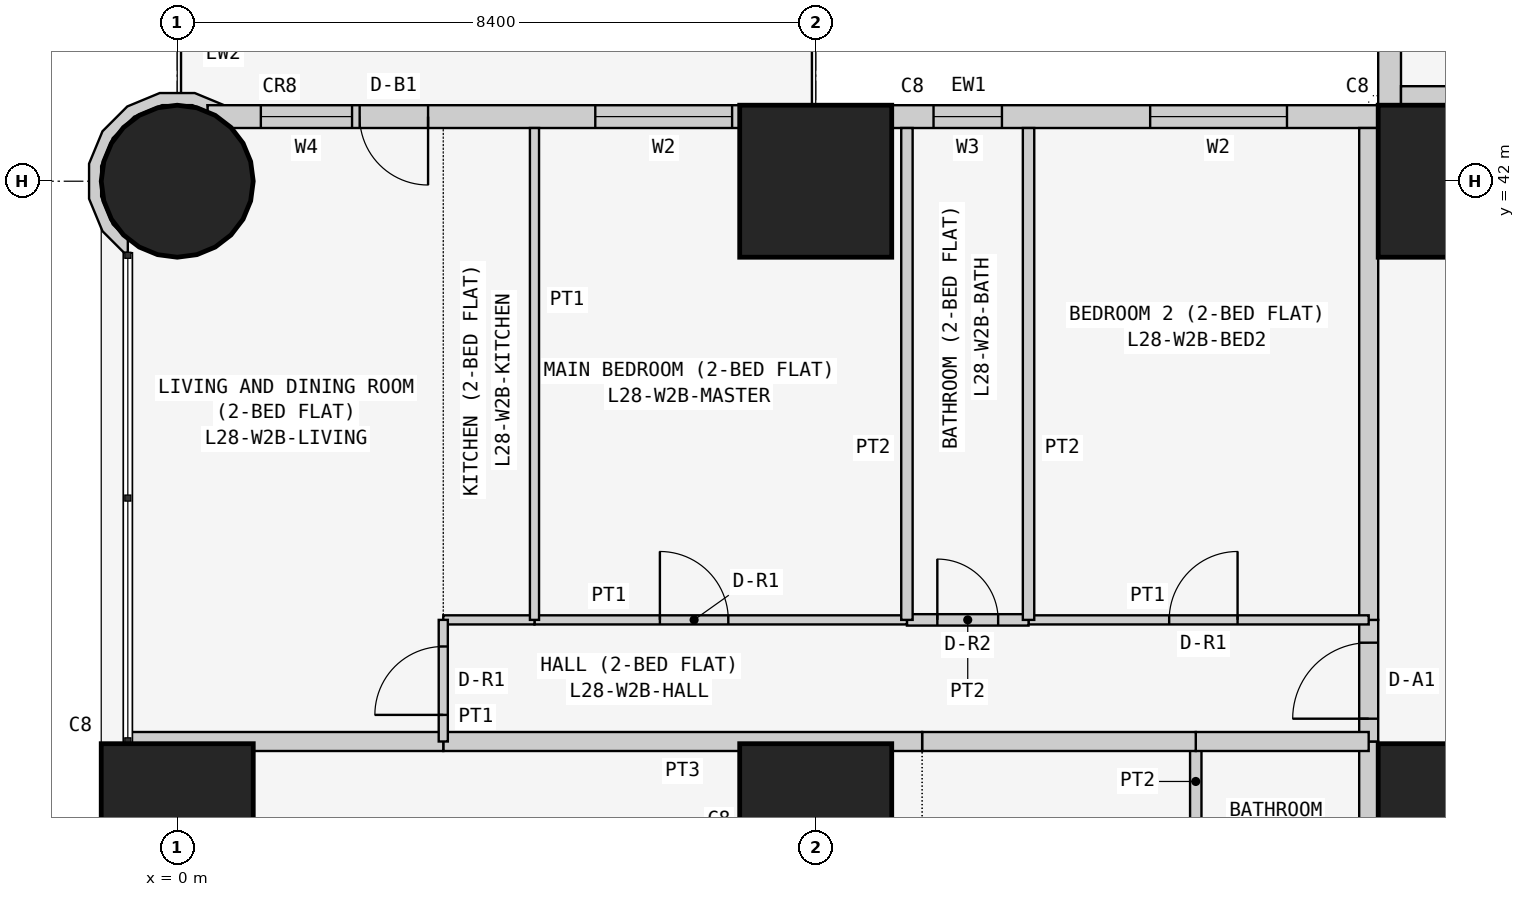
"""IFC4 building model, lengths in metres.
Left out: names, types, materials, properties, quantities, classifications, styles, units other than length and angle.
Written with IfcOpenShell. Run it as: python <this file> out.ifc"""

import sys

from ifc_helpers import new_model, si_unit, direction, frame, frame_2d, origin, origin_2d, place, context, subcontext, project, spatial, polyline, rectangle, circle, outline, extrude, element, fill, save


model = new_model("IFC4")
c1 = context("Model", 3, precision=1e-05, world=origin(), true_north=direction((0.0, 1.0)))
c2 = subcontext(c1, "Body", "Model", "MODEL_VIEW")
j1 = project(units=[si_unit("LENGTHUNIT", "METRE"), si_unit("PLANEANGLEUNIT", "RADIAN")], contexts=[c1])
p1 = place(None, origin())
s1 = spatial("IfcSite", under=j1, at=p1, CompositionType="ELEMENT")
p2 = place(p1, origin())
s2 = spatial("IfcBuilding", under=s1, at=p2, CompositionType="ELEMENT")
p3 = place(p2, frame((0.0, 0.0, 112.5)))
s3 = spatial("IfcBuildingStorey", under=s2, at=p3, CompositionType="ELEMENT", Elevation=112.5)
p4 = place(p3, frame((0.0, 33.6, 0.0), z_axis=(0.0, 0.0, 1.0), x_axis=(1.0, 0.0, 0.0)))
e1 = element("IfcColumn", 1, at=p4, inside=s3, PredefinedType="COLUMN", context=c2, shape_type="SweptSolid", body=[
    extrude(rectangle(XDim=2.0, YDim=2.0, at=origin_2d()), origin(), (0.0, 0.0, 1.0), 3.6),
])
p5 = place(p3, frame((0.0, 42.0, 0.0), z_axis=(0.0, 0.0, 1.0), x_axis=(1.0, 0.0, 0.0)))
e2 = element("IfcColumn", 2, at=p5, inside=s3, PredefinedType="COLUMN", context=c2, shape_type="SweptSolid", body=[
    extrude(circle(Radius=1.0, at=origin_2d()), origin(), (0.0, 0.0, 1.0), 3.6),
])
for number, where, z_axis, x_axis in (
    (3, (8.4, 33.6, 0.0), (0.0, 0.0, 1.0), (1.0, 0.0, 0.0)),
    (4, (8.4, 42.0, 0.0), (0.0, 0.0, 1.0), (1.0, 0.0, 0.0)),
    (5, (16.8, 33.6, 0.0), (0.0, 0.0, 1.0), (1.0, 0.0, 0.0)),
    (6, (16.8, 42.0, 0.0), (0.0, 0.0, 1.0), (1.0, 0.0, 0.0)),
):
    element("IfcColumn", number, at=place(p3, frame(where, z_axis=z_axis, x_axis=x_axis)), inside=s3, PredefinedType="COLUMN", context=c2, shape_type="SweptSolid", body=[
        extrude(rectangle(XDim=2.0, YDim=2.0, at=origin_2d()), origin(), (0.0, 0.0, 1.0), 3.6),
    ])
p6 = place(p3, frame((15.8, 42.85, 0.0), z_axis=(0.0, 0.0, 1.0), x_axis=(-1.0, 0.0, 0.0)))
e7 = element("IfcWall", 7, at=p6, inside=s3, PredefinedType="SOLIDWALL", context=c2, shape_type="SweptSolid", body=[
    extrude(rectangle(XDim=15.4, YDim=0.3, at=frame_2d((7.7, 0.0))), origin(), (0.0, 0.0, 1.0), 3.45),
])
p7 = place(p6, frame((1.2, 0.0, 0.9)))
e8 = element("IfcOpeningElement", 8, at=p7, cuts=e7, PredefinedType="OPENING", context=c2, shape_type="SweptSolid", body=[
    extrude(rectangle(XDim=1.8, YDim=1.5, at=frame_2d((0.9, 0.75))), frame((0.0, 0.16, 0.0), z_axis=(0.0, -1.0, 0.0), x_axis=(1.0, 0.0, 0.0)), (0.0, 0.0, 1.0), 0.32),
])
p8 = place(p6, frame((4.95, 0.0, 1.5)))
e9 = element("IfcOpeningElement", 9, at=p8, cuts=e7, PredefinedType="OPENING", context=c2, shape_type="SweptSolid", body=[
    extrude(rectangle(XDim=0.9, YDim=0.7, at=frame_2d((0.45, 0.35))), frame((0.0, 0.16, 0.0), z_axis=(0.0, -1.0, 0.0), x_axis=(1.0, 0.0, 0.0)), (0.0, 0.0, 1.0), 0.32),
])
p9 = place(p6, frame((8.5, 0.0, 0.9)))
e10 = element("IfcOpeningElement", 10, at=p9, cuts=e7, PredefinedType="OPENING", context=c2, shape_type="SweptSolid", body=[
    extrude(rectangle(XDim=1.8, YDim=1.5, at=frame_2d((0.9, 0.75))), frame((0.0, 0.16, 0.0), z_axis=(0.0, -1.0, 0.0), x_axis=(1.0, 0.0, 0.0)), (0.0, 0.0, 1.0), 0.32),
])
p10 = place(p6, frame((12.5, 0.0, 0.0)))
e11 = element("IfcOpeningElement", 11, at=p10, cuts=e7, PredefinedType="OPENING", context=c2, shape_type="SweptSolid", body=[
    extrude(rectangle(XDim=0.9, YDim=2.4, at=frame_2d((0.45, 1.2))), frame((0.0, 0.16, 0.0), z_axis=(0.0, -1.0, 0.0), x_axis=(1.0, 0.0, 0.0)), (0.0, 0.0, 1.0), 0.32),
])
p11 = place(p6, frame((13.5, 0.0, 0.9)))
e12 = element("IfcOpeningElement", 12, at=p11, cuts=e7, PredefinedType="OPENING", context=c2, shape_type="SweptSolid", body=[
    extrude(rectangle(XDim=1.2, YDim=1.5, at=frame_2d((0.6, 0.75))), frame((0.0, 0.16, 0.0), z_axis=(0.0, -1.0, 0.0), x_axis=(1.0, 0.0, 0.0)), (0.0, 0.0, 1.0), 0.32),
])
p12 = place(p3, frame((15.95, 50.0, 0.0), z_axis=(0.0, 0.0, 1.0), x_axis=(0.0, -1.0, 0.0)))
e13 = element("IfcWall", 13, at=p12, inside=s3, PredefinedType="SOLIDWALL", context=c2, shape_type="SweptSolid", body=[
    extrude(rectangle(XDim=7.3, YDim=0.3, at=frame_2d((3.65, 0.0))), origin(), (0.0, 0.0, 1.0), 3.45),
])
p13 = place(p12, frame((3.1, 0.0, 0.9)))
e14 = element("IfcOpeningElement", 14, at=p13, cuts=e13, PredefinedType="OPENING", context=c2, shape_type="SweptSolid", body=[
    extrude(rectangle(XDim=2.4, YDim=1.5, at=frame_2d((1.2, 0.75))), frame((0.0, 0.16, 0.0), z_axis=(0.0, -1.0, 0.0), x_axis=(1.0, 0.0, 0.0)), (0.0, 0.0, 1.0), 0.32),
])
p14 = place(p12, frame((0.75, 0.0, 0.9)))
e15 = element("IfcOpeningElement", 15, at=p14, cuts=e13, PredefinedType="OPENING", context=c2, shape_type="SweptSolid", body=[
    extrude(rectangle(XDim=1.2, YDim=1.5, at=frame_2d((0.6, 0.75))), frame((0.0, 0.16, 0.0), z_axis=(0.0, -1.0, 0.0), x_axis=(1.0, 0.0, 0.0)), (0.0, 0.0, 1.0), 0.32),
])
p15 = place(p3, frame((0.567, 42.919, 0.0), z_axis=(0.0, 0.0, 1.0), x_axis=(-0.831199417842, 0.555974394895, 0.0)))
e16 = element("IfcWall", 16, at=p15, inside=s3, PredefinedType="SOLIDWALL", context=c2, shape_type="SweptSolid", body=[
    extrude(outline(polyline([(0.004, -0.095), (0.413, -0.013), (0.797, 0.243), (1.053, 0.627), (1.143, 1.08), (1.053, 1.532), (0.796, 1.916), (0.412, 2.172), (0.017, 2.251), (-0.023, 2.224), (0.075, 2.077), (0.351, 2.022), (0.682, 1.801), (0.903, 1.47), (0.981, 1.08), (0.903, 0.689), (0.682, 0.358), (0.351, 0.137), (0.126, 0.092), (0.184, 0.026), (0.004, -0.095)])), origin(), (0.0, 0.0, 1.0), 3.45),
])
p16 = place(p3, frame((16.1, 43.125, 0.0), z_axis=(0.0, 0.0, 1.0), x_axis=(1.0, 0.0, 0.0)))
e17 = element("IfcWall", 17, at=p16, inside=s3, PredefinedType="PARTITIONING", context=c2, shape_type="SweptSolid", body=[
    extrude(rectangle(XDim=6.871, YDim=0.25, at=frame_2d((3.436, 0.0))), origin(), (0.0, 0.0, 1.0), 3.45),
])
p17 = place(p3, frame((15.675, 32.0, 0.0), z_axis=(0.0, 0.0, 1.0), x_axis=(0.0, 1.0, 0.0)))
e18 = element("IfcWall", 18, at=p17, inside=s3, PredefinedType="PARTITIONING", context=c2, shape_type="SweptSolid", body=[
    extrude(rectangle(XDim=2.629, YDim=0.25, at=frame_2d((1.314, 0.0))), origin(), (0.0, 0.0, 1.0), 3.45),
])
p18 = place(p3, frame((15.675, 34.629, 0.0), z_axis=(0.0, 0.0, 1.0), x_axis=(0.0, 1.0, 0.0)))
e19 = element("IfcWall", 19, at=p18, inside=s3, PredefinedType="PARTITIONING", context=c2, shape_type="SweptSolid", body=[
    extrude(rectangle(XDim=1.6, YDim=0.25, at=frame_2d((0.8, 0.0))), origin(), (0.0, 0.0, 1.0), 3.45),
])
p19 = place(p18, frame((0.3, 0.0, 0.0)))
e20 = element("IfcOpeningElement", 20, at=p19, cuts=e19, PredefinedType="OPENING", context=c2, shape_type="SweptSolid", body=[
    extrude(rectangle(XDim=1.0, YDim=2.1, at=frame_2d((0.5, 1.05))), frame((0.0, 0.135, 0.0), z_axis=(0.0, -1.0, 0.0), x_axis=(1.0, 0.0, 0.0)), (0.0, 0.0, 1.0), 0.27),
])
p20 = place(p3, frame((15.675, 36.229, 0.0), z_axis=(0.0, 0.0, 1.0), x_axis=(0.0, 1.0, 0.0)))
e21 = element("IfcWall", 21, at=p20, inside=s3, PredefinedType="PARTITIONING", context=c2, shape_type="SweptSolid", body=[
    extrude(rectangle(XDim=6.471, YDim=0.25, at=frame_2d((3.235, 0.0))), origin(), (0.0, 0.0, 1.0), 3.45),
])
p21 = place(p3, frame((13.4, 32.0, 0.0), z_axis=(0.0, 0.0, 1.0), x_axis=(0.0, 1.0, 0.0)))
e22 = element("IfcWall", 22, at=p21, inside=s3, PredefinedType="PARTITIONING", context=c2, shape_type="SweptSolid", body=[
    extrude(rectangle(XDim=2.629, YDim=0.15, at=frame_2d((1.314, 0.0))), origin(), (0.0, 0.0, 1.0), 3.45),
])
p22 = place(p3, frame((13.4, 34.629, 0.0), z_axis=(0.0, 0.0, 1.0), x_axis=(1.0, 0.0, 0.0)))
e23 = element("IfcWall", 23, at=p22, inside=s3, PredefinedType="PARTITIONING", context=c2, shape_type="SweptSolid", body=[
    extrude(rectangle(XDim=2.275, YDim=0.25, at=frame_2d((1.138, 0.0))), origin(), (0.0, 0.0, 1.0), 3.45),
])
p23 = place(p3, frame((9.8, 34.629, 0.0), z_axis=(0.0, 0.0, 1.0), x_axis=(1.0, 0.0, 0.0)))
e24 = element("IfcWall", 24, at=p23, inside=s3, PredefinedType="PARTITIONING", context=c2, shape_type="SweptSolid", body=[
    extrude(rectangle(XDim=3.6, YDim=0.25, at=frame_2d((1.8, 0.0))), origin(), (0.0, 0.0, 1.0), 3.45),
])
p24 = place(p3, frame((3.5, 34.629, 0.0), z_axis=(0.0, 0.0, 1.0), x_axis=(1.0, 0.0, 0.0)))
e25 = element("IfcWall", 25, at=p24, inside=s3, PredefinedType="PARTITIONING", context=c2, shape_type="SweptSolid", body=[
    extrude(rectangle(XDim=6.3, YDim=0.25, at=frame_2d((3.15, 0.0))), origin(), (0.0, 0.0, 1.0), 3.45),
])
p25 = place(p3, frame((-0.65, 34.629, 0.0), z_axis=(0.0, 0.0, 1.0), x_axis=(1.0, 0.0, 0.0)))
e26 = element("IfcWall", 26, at=p25, inside=s3, PredefinedType="PARTITIONING", context=c2, shape_type="SweptSolid", body=[
    extrude(rectangle(XDim=4.15, YDim=0.25, at=frame_2d((2.075, 0.0))), origin(), (0.0, 0.0, 1.0), 3.45),
])
p26 = place(p3, frame((11.2, 36.229, 0.0), z_axis=(0.0, 0.0, 1.0), x_axis=(1.0, 0.0, 0.0)))
e27 = element("IfcWall", 27, at=p26, inside=s3, PredefinedType="PARTITIONING", context=c2, shape_type="SweptSolid", body=[
    extrude(rectangle(XDim=4.475, YDim=0.12, at=frame_2d((2.238, 0.0))), origin(), (0.0, 0.0, 1.0), 3.45),
])
p27 = place(p26, frame((1.85, 0.0, 0.0)))
e28 = element("IfcOpeningElement", 28, at=p27, cuts=e27, PredefinedType="OPENING", context=c2, shape_type="SweptSolid", body=[
    extrude(rectangle(XDim=0.9, YDim=2.1, at=frame_2d((0.45, 1.05))), frame((0.0, 0.07, 0.0), z_axis=(0.0, -1.0, 0.0), x_axis=(1.0, 0.0, 0.0)), (0.0, 0.0, 1.0), 0.14),
])
p28 = place(p3, frame((9.6, 36.229, 0.0), z_axis=(0.0, 0.0, 1.0), x_axis=(1.0, 0.0, 0.0)))
e29 = element("IfcWall", 29, at=p28, inside=s3, PredefinedType="PARTITIONING", context=c2, shape_type="SweptSolid", body=[
    extrude(rectangle(XDim=1.6, YDim=0.15, at=frame_2d((0.8, 0.0))), origin(), (0.0, 0.0, 1.0), 3.45),
])
p29 = place(p28, frame((0.4, 0.0, 0.0)))
e30 = element("IfcOpeningElement", 30, at=p29, cuts=e29, PredefinedType="OPENING", context=c2, shape_type="SweptSolid", body=[
    extrude(rectangle(XDim=0.8, YDim=2.1, at=frame_2d((0.4, 1.05))), frame((0.0, 0.085, 0.0), z_axis=(0.0, -1.0, 0.0), x_axis=(1.0, 0.0, 0.0)), (0.0, 0.0, 1.0), 0.17),
])
p30 = place(p3, frame((4.7, 36.229, 0.0), z_axis=(0.0, 0.0, 1.0), x_axis=(1.0, 0.0, 0.0)))
e31 = element("IfcWall", 31, at=p30, inside=s3, PredefinedType="PARTITIONING", context=c2, shape_type="SweptSolid", body=[
    extrude(rectangle(XDim=4.9, YDim=0.12, at=frame_2d((2.45, 0.0))), origin(), (0.0, 0.0, 1.0), 3.45),
])
p31 = place(p30, frame((1.65, 0.0, 0.0)))
e32 = element("IfcOpeningElement", 32, at=p31, cuts=e31, PredefinedType="OPENING", context=c2, shape_type="SweptSolid", body=[
    extrude(rectangle(XDim=0.9, YDim=2.1, at=frame_2d((0.45, 1.05))), frame((0.0, 0.07, 0.0), z_axis=(0.0, -1.0, 0.0), x_axis=(1.0, 0.0, 0.0)), (0.0, 0.0, 1.0), 0.14),
])
p32 = place(p3, frame((3.5, 36.229, 0.0), z_axis=(0.0, 0.0, 1.0), x_axis=(1.0, 0.0, 0.0)))
e33 = element("IfcWall", 33, at=p32, inside=s3, PredefinedType="PARTITIONING", context=c2, shape_type="SweptSolid", body=[
    extrude(rectangle(XDim=1.2, YDim=0.12, at=frame_2d((0.6, 0.0))), origin(), (0.0, 0.0, 1.0), 3.45),
])
p33 = place(p3, frame((3.5, 34.629, 0.0), z_axis=(0.0, 0.0, 1.0), x_axis=(0.0, 1.0, 0.0)))
e34 = element("IfcWall", 34, at=p33, inside=s3, PredefinedType="PARTITIONING", context=c2, shape_type="SweptSolid", body=[
    extrude(rectangle(XDim=1.6, YDim=0.12, at=frame_2d((0.8, 0.0))), origin(), (0.0, 0.0, 1.0), 3.45),
])
p34 = place(p33, frame((0.35, 0.0, 0.0)))
e35 = element("IfcOpeningElement", 35, at=p34, cuts=e34, PredefinedType="OPENING", context=c2, shape_type="SweptSolid", body=[
    extrude(rectangle(XDim=0.9, YDim=2.1, at=frame_2d((0.45, 1.05))), frame((0.0, 0.07, 0.0), z_axis=(0.0, -1.0, 0.0), x_axis=(1.0, 0.0, 0.0)), (0.0, 0.0, 1.0), 0.14),
])
for number, where, z_axis, x_axis in (
    (36, (11.2, 36.229, 0.0), (0.0, 0.0, 1.0), (0.0, 1.0, 0.0)),
    (37, (9.6, 36.229, 0.0), (0.0, 0.0, 1.0), (0.0, 1.0, 0.0)),
):
    element("IfcWall", number, at=place(p3, frame(where, z_axis=z_axis, x_axis=x_axis)), inside=s3, PredefinedType="PARTITIONING", context=c2, shape_type="SweptSolid", body=[
        extrude(rectangle(XDim=6.471, YDim=0.15, at=frame_2d((3.235, 0.0))), origin(), (0.0, 0.0, 1.0), 3.45),
    ])
p35 = place(p3, frame((4.7, 36.229, 0.0), z_axis=(0.0, 0.0, 1.0), x_axis=(0.0, 1.0, 0.0)))
e38 = element("IfcWall", 38, at=p35, inside=s3, PredefinedType="PARTITIONING", context=c2, shape_type="SweptSolid", body=[
    extrude(rectangle(XDim=6.471, YDim=0.12, at=frame_2d((3.235, 0.0))), origin(), (0.0, 0.0, 1.0), 3.45),
])
p36 = place(p7, origin())
e39 = element("IfcWindow", 39, at=p36, inside=s3, PartitioningType="SINGLE_PANEL", PredefinedType="WINDOW", context=c2, shape_type="SweptSolid", body=[
    extrude(rectangle(XDim=1.8, YDim=1.5, at=frame_2d((0.9, 0.75))), frame((0.0, 0.03, 0.0), z_axis=(0.0, -1.0, 0.0), x_axis=(1.0, 0.0, 0.0)), (0.0, 0.0, 1.0), 0.06),
])
fill(e8, e39)
p37 = place(p8, origin())
e40 = element("IfcWindow", 40, at=p37, inside=s3, PartitioningType="SINGLE_PANEL", PredefinedType="WINDOW", context=c2, shape_type="SweptSolid", body=[
    extrude(rectangle(XDim=0.9, YDim=0.7, at=frame_2d((0.45, 0.35))), frame((0.0, 0.03, 0.0), z_axis=(0.0, -1.0, 0.0), x_axis=(1.0, 0.0, 0.0)), (0.0, 0.0, 1.0), 0.06),
])
fill(e9, e40)
p38 = place(p9, origin())
e41 = element("IfcWindow", 41, at=p38, inside=s3, PartitioningType="SINGLE_PANEL", PredefinedType="WINDOW", context=c2, shape_type="SweptSolid", body=[
    extrude(rectangle(XDim=1.8, YDim=1.5, at=frame_2d((0.9, 0.75))), frame((0.0, 0.03, 0.0), z_axis=(0.0, -1.0, 0.0), x_axis=(1.0, 0.0, 0.0)), (0.0, 0.0, 1.0), 0.06),
])
fill(e10, e41)
p39 = place(p10, origin())
e42 = element("IfcDoor", 42, at=p39, inside=s3, OperationType="SINGLE_SWING_LEFT", PredefinedType="DOOR", context=c2, shape_type="SweptSolid", body=[
    extrude(rectangle(XDim=0.9, YDim=2.4, at=frame_2d((0.45, 1.2))), frame((0.0, 0.025, 0.0), z_axis=(0.0, -1.0, 0.0), x_axis=(1.0, 0.0, 0.0)), (0.0, 0.0, 1.0), 0.05),
])
fill(e11, e42)
p40 = place(p11, origin())
e43 = element("IfcWindow", 43, at=p40, inside=s3, PartitioningType="SINGLE_PANEL", PredefinedType="WINDOW", context=c2, shape_type="SweptSolid", body=[
    extrude(rectangle(XDim=1.2, YDim=1.5, at=frame_2d((0.6, 0.75))), frame((0.0, 0.03, 0.0), z_axis=(0.0, -1.0, 0.0), x_axis=(1.0, 0.0, 0.0)), (0.0, 0.0, 1.0), 0.06),
])
fill(e12, e43)
p41 = place(p19, origin())
e44 = element("IfcDoor", 44, at=p41, inside=s3, OperationType="SINGLE_SWING_LEFT", PredefinedType="DOOR", context=c2, shape_type="SweptSolid", body=[
    extrude(rectangle(XDim=1.0, YDim=2.1, at=frame_2d((0.5, 1.05))), frame((0.0, 0.025, 0.0), z_axis=(0.0, -1.0, 0.0), x_axis=(1.0, 0.0, 0.0)), (0.0, 0.0, 1.0), 0.05),
])
fill(e20, e44)
p42 = place(p27, origin())
e45 = element("IfcDoor", 45, at=p42, inside=s3, OperationType="SINGLE_SWING_RIGHT", PredefinedType="DOOR", context=c2, shape_type="SweptSolid", body=[
    extrude(rectangle(XDim=0.9, YDim=2.1, at=frame_2d((0.45, 1.05))), frame((0.0, 0.025, 0.0), z_axis=(0.0, -1.0, 0.0), x_axis=(1.0, 0.0, 0.0)), (0.0, 0.0, 1.0), 0.05),
])
fill(e28, e45)
p43 = place(p29, origin())
e46 = element("IfcDoor", 46, at=p43, inside=s3, OperationType="SINGLE_SWING_LEFT", PredefinedType="DOOR", context=c2, shape_type="SweptSolid", body=[
    extrude(rectangle(XDim=0.8, YDim=2.1, at=frame_2d((0.4, 1.05))), frame((0.0, 0.025, 0.0), z_axis=(0.0, -1.0, 0.0), x_axis=(1.0, 0.0, 0.0)), (0.0, 0.0, 1.0), 0.05),
])
fill(e30, e46)
p44 = place(p31, origin())
e47 = element("IfcDoor", 47, at=p44, inside=s3, OperationType="SINGLE_SWING_LEFT", PredefinedType="DOOR", context=c2, shape_type="SweptSolid", body=[
    extrude(rectangle(XDim=0.9, YDim=2.1, at=frame_2d((0.45, 1.05))), frame((0.0, 0.025, 0.0), z_axis=(0.0, -1.0, 0.0), x_axis=(1.0, 0.0, 0.0)), (0.0, 0.0, 1.0), 0.05),
])
fill(e32, e47)
p45 = place(p34, origin())
e48 = element("IfcDoor", 48, at=p45, inside=s3, OperationType="SINGLE_SWING_LEFT", PredefinedType="DOOR", context=c2, shape_type="SweptSolid", body=[
    extrude(rectangle(XDim=0.9, YDim=2.1, at=frame_2d((0.45, 1.05))), frame((0.0, 0.025, 0.0), z_axis=(0.0, -1.0, 0.0), x_axis=(1.0, 0.0, 0.0)), (0.0, 0.0, 1.0), 0.05),
])
fill(e35, e48)
save(model, sys.argv[1])
